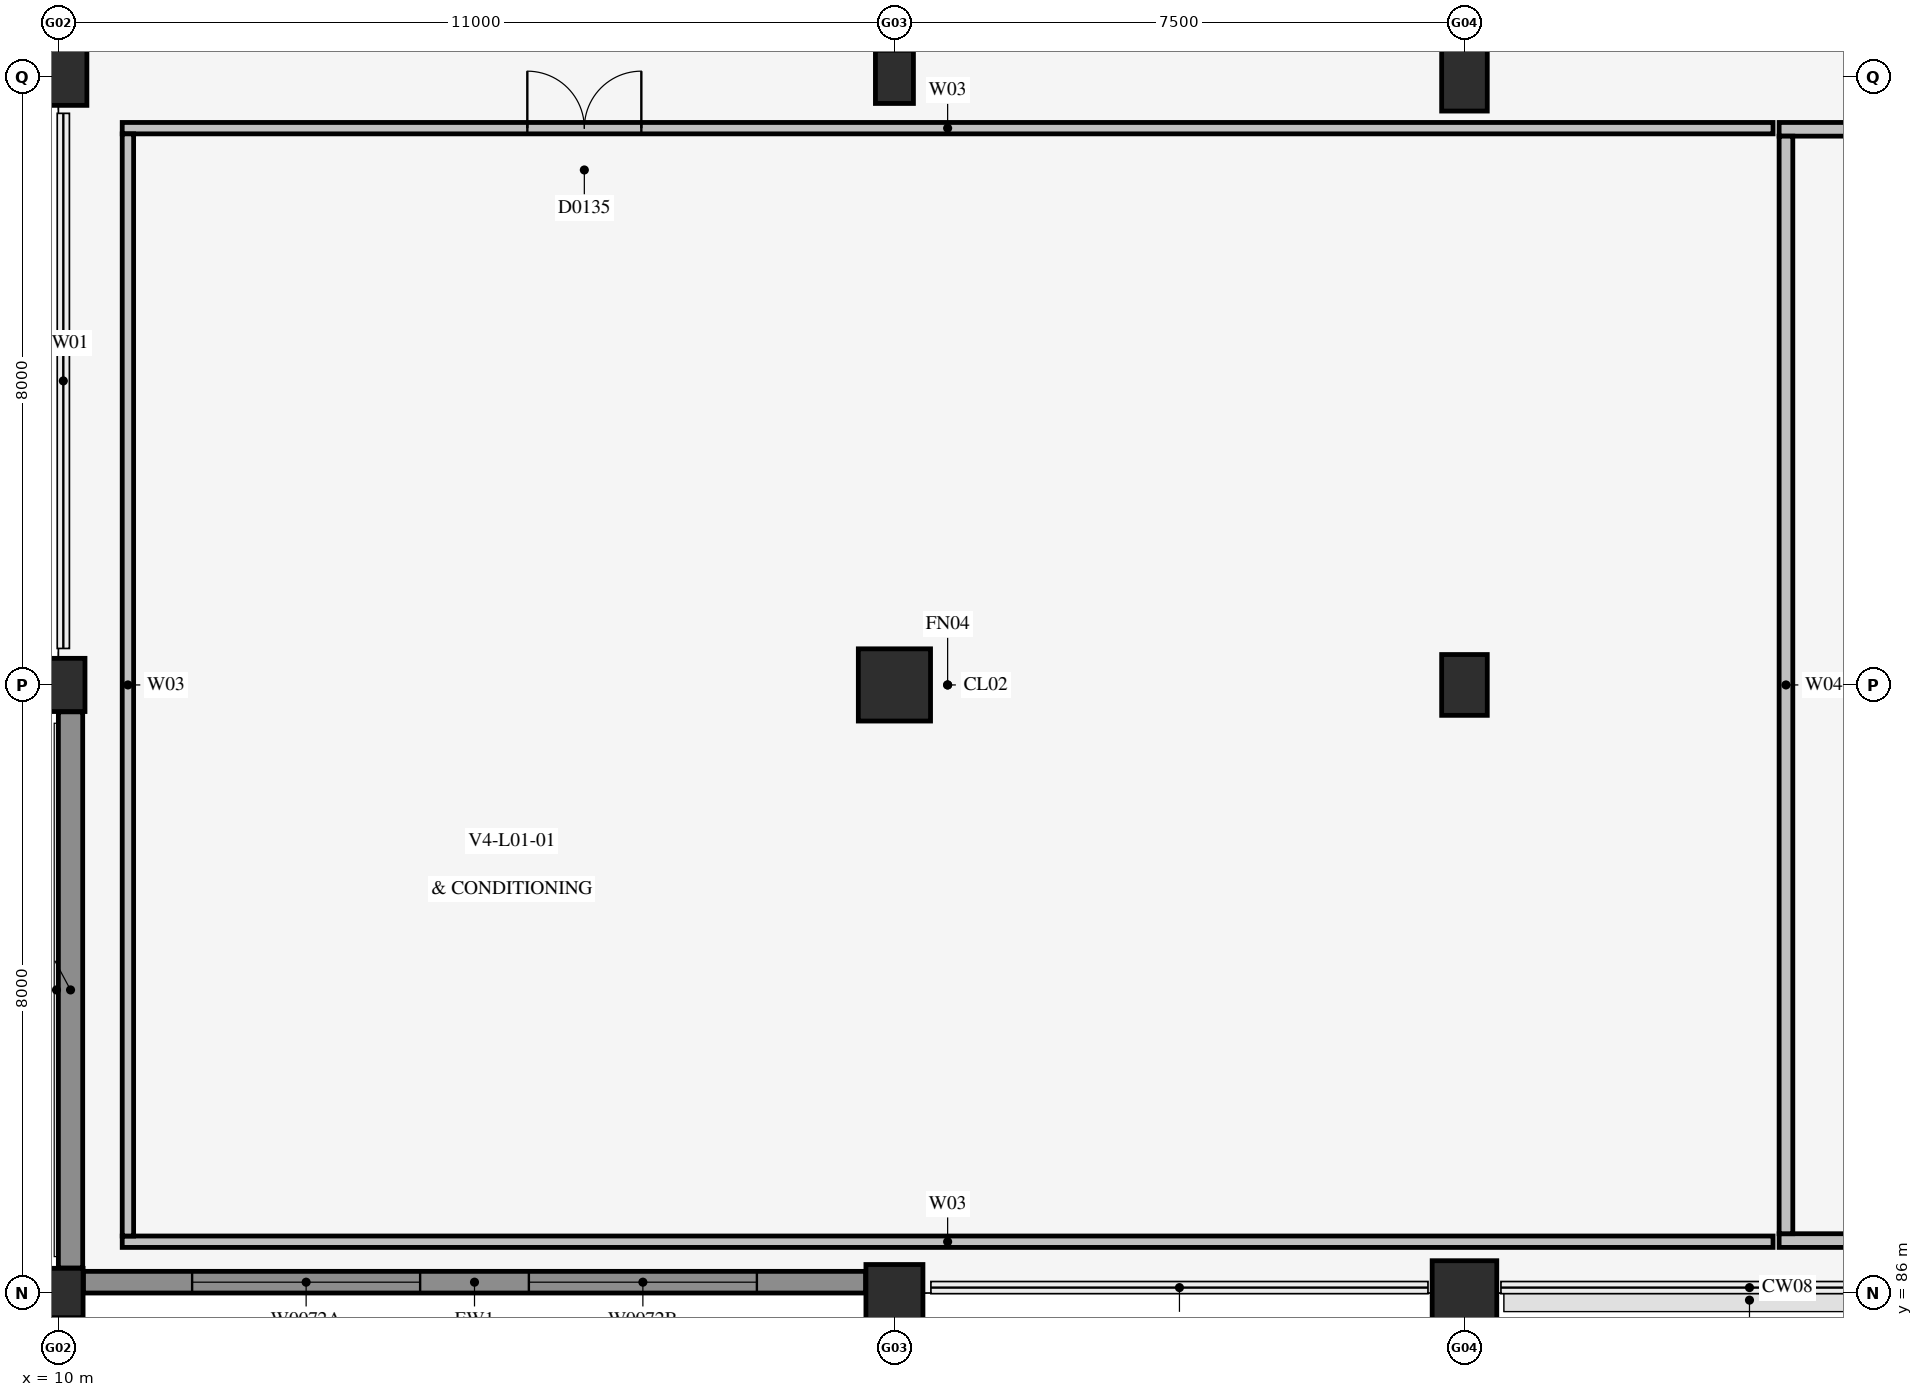
"""IFC4 building model, lengths in metres.
Left out: names, types, materials, properties, quantities, classifications, styles, units other than length and angle.
Written with IfcOpenShell. Run it as: python <this file> out.ifc"""

import sys

from ifc_helpers import new_model, si_unit, direction, frame, frame_2d, origin, origin_2d, place, context, subcontext, project, spatial, rectangle, extrude, element, fill, save


model = new_model("IFC4")
c1 = context("Model", 3, precision=1e-05, world=origin(), true_north=direction((0.0, 1.0)))
c2 = subcontext(c1, "Body", "Model", "MODEL_VIEW")
j1 = project(units=[si_unit("LENGTHUNIT", "METRE"), si_unit("PLANEANGLEUNIT", "RADIAN")], contexts=[c1])
p1 = place(None, origin())
s1 = spatial("IfcSite", under=j1, at=p1, CompositionType="ELEMENT")
p2 = place(p1, origin())
s2 = spatial("IfcBuilding", under=s1, at=p2, CompositionType="ELEMENT")
p3 = place(p2, frame((0.0, 0.0, 5.4)))
s3 = spatial("IfcBuildingStorey", under=s2, at=p3, CompositionType="ELEMENT", Elevation=5.4)
p4 = place(p3, frame((10.0, 86.0, 0.0), z_axis=(0.0, 0.0, 1.0), x_axis=(1.0, 0.0, 0.0)))
e1 = element("IfcColumn", 1, at=p4, inside=s3, PredefinedType="COLUMN", context=c2, shape_type="SweptSolid", body=[
    extrude(rectangle(XDim=0.65, YDim=0.65, at=origin_2d()), origin(), (0.0, 0.0, 1.0), 4.5),
])
p5 = place(p3, frame((10.0, 94.0, 0.0), z_axis=(0.0, 0.0, 1.0), x_axis=(1.0, 0.0, 0.0)))
e2 = element("IfcColumn", 2, at=p5, inside=s3, PredefinedType="COLUMN", context=c2, shape_type="SweptSolid", body=[
    extrude(rectangle(XDim=0.7, YDim=0.7, at=origin_2d()), origin(), (0.0, 0.0, 1.0), 4.8),
])
p6 = place(p3, frame((10.0, 102.0, 0.0), z_axis=(0.0, 0.0, 1.0), x_axis=(1.0, 0.0, 0.0)))
e3 = element("IfcColumn", 3, at=p6, inside=s3, PredefinedType="COLUMN", context=c2, shape_type="SweptSolid", body=[
    extrude(rectangle(XDim=0.75, YDim=0.75, at=origin_2d()), origin(), (0.0, 0.0, 1.0), 4.8),
])
p7 = place(p3, frame((21.0, 86.0, 0.0), z_axis=(0.0, 0.0, 1.0), x_axis=(1.0, 0.0, 0.0)))
e4 = element("IfcColumn", 4, at=p7, inside=s3, PredefinedType="COLUMN", context=c2, shape_type="SweptSolid", body=[
    extrude(rectangle(XDim=0.75, YDim=0.75, at=origin_2d()), origin(), (0.0, 0.0, 1.0), 4.5),
])
p8 = place(p3, frame((21.0, 94.0, 0.0), z_axis=(0.0, 0.0, 1.0), x_axis=(1.0, 0.0, 0.0)))
e5 = element("IfcColumn", 5, at=p8, inside=s3, PredefinedType="COLUMN", context=c2, shape_type="SweptSolid", body=[
    extrude(rectangle(XDim=0.95, YDim=0.95, at=origin_2d()), origin(), (0.0, 0.0, 1.0), 4.8),
])
p9 = place(p3, frame((21.0, 102.0, 0.0), z_axis=(0.0, 0.0, 1.0), x_axis=(1.0, 0.0, 0.0)))
e6 = element("IfcColumn", 6, at=p9, inside=s3, PredefinedType="COLUMN", context=c2, shape_type="SweptSolid", body=[
    extrude(rectangle(XDim=0.5, YDim=0.7, at=origin_2d()), origin(), (0.0, 0.0, 1.0), 4.8),
])
p10 = place(p3, frame((28.5, 86.0, 0.0), z_axis=(0.0, 0.0, 1.0), x_axis=(1.0, 0.0, 0.0)))
e7 = element("IfcColumn", 7, at=p10, inside=s3, PredefinedType="COLUMN", context=c2, shape_type="SweptSolid", body=[
    extrude(rectangle(XDim=0.85, YDim=0.85, at=origin_2d()), origin(), (0.0, 0.0, 1.0), 4.5),
])
p11 = place(p3, frame((28.5, 94.0, 0.0), z_axis=(0.0, 0.0, 1.0), x_axis=(1.0, 0.0, 0.0)))
e8 = element("IfcColumn", 8, at=p11, inside=s3, PredefinedType="COLUMN", context=c2, shape_type="SweptSolid", body=[
    extrude(rectangle(XDim=0.6, YDim=0.8, at=origin_2d()), origin(), (0.0, 0.0, 1.0), 4.8),
])
p12 = place(p3, frame((28.5, 102.0, 0.0), z_axis=(0.0, 0.0, 1.0), x_axis=(1.0, 0.0, 0.0)))
e9 = element("IfcColumn", 9, at=p12, inside=s3, PredefinedType="COLUMN", context=c2, shape_type="SweptSolid", body=[
    extrude(rectangle(XDim=0.6, YDim=0.9, at=origin_2d()), origin(), (0.0, 0.0, 1.0), 4.8),
])
p13 = place(p3, frame((10.84, 86.675, 0.0), z_axis=(0.0, 0.0, 1.0), x_axis=(1.0, 0.0, 0.0)))
e10 = element("IfcWall", 10, at=p13, inside=s3, PredefinedType="PARTITIONING", context=c2, shape_type="SweptSolid", body=[
    extrude(rectangle(XDim=21.72, YDim=0.15, at=frame_2d((10.86, 0.0))), origin(), (0.0, 0.0, 1.0), 4.485),
])
p14 = place(p3, frame((10.84, 101.325, 0.0), z_axis=(0.0, 0.0, 1.0), x_axis=(1.0, 0.0, 0.0)))
e11 = element("IfcWall", 11, at=p14, inside=s3, PredefinedType="PARTITIONING", context=c2, shape_type="SweptSolid", body=[
    extrude(rectangle(XDim=21.72, YDim=0.15, at=frame_2d((10.86, 0.0))), origin(), (0.0, 0.0, 1.0), 4.485),
])
p15 = place(p14, frame((5.33, 0.0, 0.0)))
e12 = element("IfcOpeningElement", 12, at=p15, cuts=e11, PredefinedType="OPENING", context=c2, shape_type="SweptSolid", body=[
    extrude(rectangle(XDim=1.5, YDim=2.3, at=frame_2d((0.75, 1.15))), frame((0.0, 0.087, 0.0), z_axis=(0.0, -1.0, 0.0), x_axis=(1.0, 0.0, 0.0)), (0.0, 0.0, 1.0), 0.174),
])
p16 = place(p3, frame((10.915, 86.75, 0.0), z_axis=(0.0, 0.0, 1.0), x_axis=(0.0, 1.0, 0.0)))
e13 = element("IfcWall", 13, at=p16, inside=s3, PredefinedType="PARTITIONING", context=c2, shape_type="SweptSolid", body=[
    extrude(rectangle(XDim=14.5, YDim=0.15, at=frame_2d((7.25, 0.0))), origin(), (0.0, 0.0, 1.0), 4.485),
])
p17 = place(p3, frame((32.64, 86.69, 0.0), z_axis=(0.0, 0.0, 1.0), x_axis=(1.0, 0.0, 0.0)))
e14 = element("IfcWall", 14, at=p17, inside=s3, PredefinedType="PARTITIONING", context=c2, shape_type="SweptSolid", body=[
    extrude(rectangle(XDim=21.72, YDim=0.18, at=frame_2d((10.86, 0.0))), origin(), (0.0, 0.0, 1.0), 4.485),
])
p18 = place(p3, frame((32.64, 101.31, 0.0), z_axis=(0.0, 0.0, 1.0), x_axis=(1.0, 0.0, 0.0)))
e15 = element("IfcWall", 15, at=p18, inside=s3, PredefinedType="PARTITIONING", context=c2, shape_type="SweptSolid", body=[
    extrude(rectangle(XDim=21.72, YDim=0.18, at=frame_2d((10.86, 0.0))), origin(), (0.0, 0.0, 1.0), 4.485),
])
p19 = place(p18, frame((8.006, 0.0, 0.0)))
e16 = element("IfcOpeningElement", 16, at=p19, cuts=e15, PredefinedType="OPENING", context=c2, shape_type="SweptSolid", body=[
    extrude(rectangle(XDim=1.0, YDim=2.2, at=frame_2d((0.5, 1.1))), frame((0.0, 0.102, 0.0), z_axis=(0.0, -1.0, 0.0), x_axis=(1.0, 0.0, 0.0)), (0.0, 0.0, 1.0), 0.204),
])
p20 = place(p3, frame((32.73, 86.78, 0.0), z_axis=(0.0, 0.0, 1.0), x_axis=(0.0, 1.0, 0.0)))
e17 = element("IfcWall", 17, at=p20, inside=s3, PredefinedType="PARTITIONING", context=c2, shape_type="SweptSolid", body=[
    extrude(rectangle(XDim=14.44, YDim=0.18, at=frame_2d((7.22, 0.0))), origin(), (0.0, 0.0, 1.0), 4.485),
])
p21 = place(p3, frame((10.329, 86.143, 0.0), z_axis=(0.0, 0.0, 1.0), x_axis=(1.0, 0.0, 0.0)))
e18 = element("IfcWall", 18, at=p21, inside=s3, PredefinedType="SOLIDWALL", context=c2, shape_type="SweptSolid", body=[
    extrude(rectangle(XDim=10.292, YDim=0.285, at=frame_2d((5.146, 0.0))), origin(), (0.0, 0.0, 1.0), 4.01),
])
p22 = place(p21, frame((1.431, 0.0, 0.95)))
e19 = element("IfcOpeningElement", 19, at=p22, cuts=e18, PredefinedType="OPENING", context=c2, shape_type="SweptSolid", body=[
    extrude(rectangle(XDim=3.0, YDim=1.5, at=frame_2d((1.5, 0.75))), frame((0.0, 0.154, 0.0), z_axis=(0.0, -1.0, 0.0), x_axis=(1.0, 0.0, 0.0)), (0.0, 0.0, 1.0), 0.309),
])
p23 = place(p21, frame((5.861, 0.0, 0.95)))
e20 = element("IfcOpeningElement", 20, at=p23, cuts=e18, PredefinedType="OPENING", context=c2, shape_type="SweptSolid", body=[
    extrude(rectangle(XDim=3.0, YDim=1.5, at=frame_2d((1.5, 0.75))), frame((0.0, 0.154, 0.0), z_axis=(0.0, -1.0, 0.0), x_axis=(1.0, 0.0, 0.0)), (0.0, 0.0, 1.0), 0.309),
])
p24 = place(p3, frame((10.16, 86.329, 0.0), z_axis=(0.0, 0.0, 1.0), x_axis=(0.0, 1.0, 0.0)))
e21 = element("IfcWall", 21, at=p24, inside=s3, PredefinedType="SOLIDWALL", context=c2, shape_type="SweptSolid", body=[
    extrude(rectangle(XDim=7.317, YDim=0.32, at=frame_2d((3.658, 0.0))), origin(), (0.0, 0.0, 1.0), 3.934),
])
p25 = place(p15, frame((1.5, 0.0, 0.0), z_axis=(0.0, 0.0, 1.0), x_axis=(-1.0, 0.0, 0.0)))
e22 = element("IfcDoor", 22, at=p25, inside=s3, OperationType="DOUBLE_DOOR_SINGLE_SWING", PredefinedType="DOOR", context=c2, shape_type="SweptSolid", body=[
    extrude(rectangle(XDim=1.5, YDim=2.3, at=frame_2d((0.75, 1.15))), frame((0.0, 0.025, 0.0), z_axis=(0.0, -1.0, 0.0), x_axis=(1.0, 0.0, 0.0)), (0.0, 0.0, 1.0), 0.05),
])
fill(e12, e22)
p26 = place(p22, origin())
e23 = element("IfcWindow", 23, at=p26, inside=s3, PartitioningType="SINGLE_PANEL", PredefinedType="WINDOW", context=c2, shape_type="SweptSolid", body=[
    extrude(rectangle(XDim=3.0, YDim=1.5, at=frame_2d((1.5, 0.75))), frame((0.0, 0.03, 0.0), z_axis=(0.0, -1.0, 0.0), x_axis=(1.0, 0.0, 0.0)), (0.0, 0.0, 1.0), 0.06),
])
fill(e19, e23)
p27 = place(p23, origin())
e24 = element("IfcWindow", 24, at=p27, inside=s3, PartitioningType="SINGLE_PANEL", PredefinedType="WINDOW", context=c2, shape_type="SweptSolid", body=[
    extrude(rectangle(XDim=3.0, YDim=1.5, at=frame_2d((1.5, 0.75))), frame((0.0, 0.03, 0.0), z_axis=(0.0, -1.0, 0.0), x_axis=(1.0, 0.0, 0.0)), (0.0, 0.0, 1.0), 0.06),
])
fill(e20, e24)
save(model, sys.argv[1])
